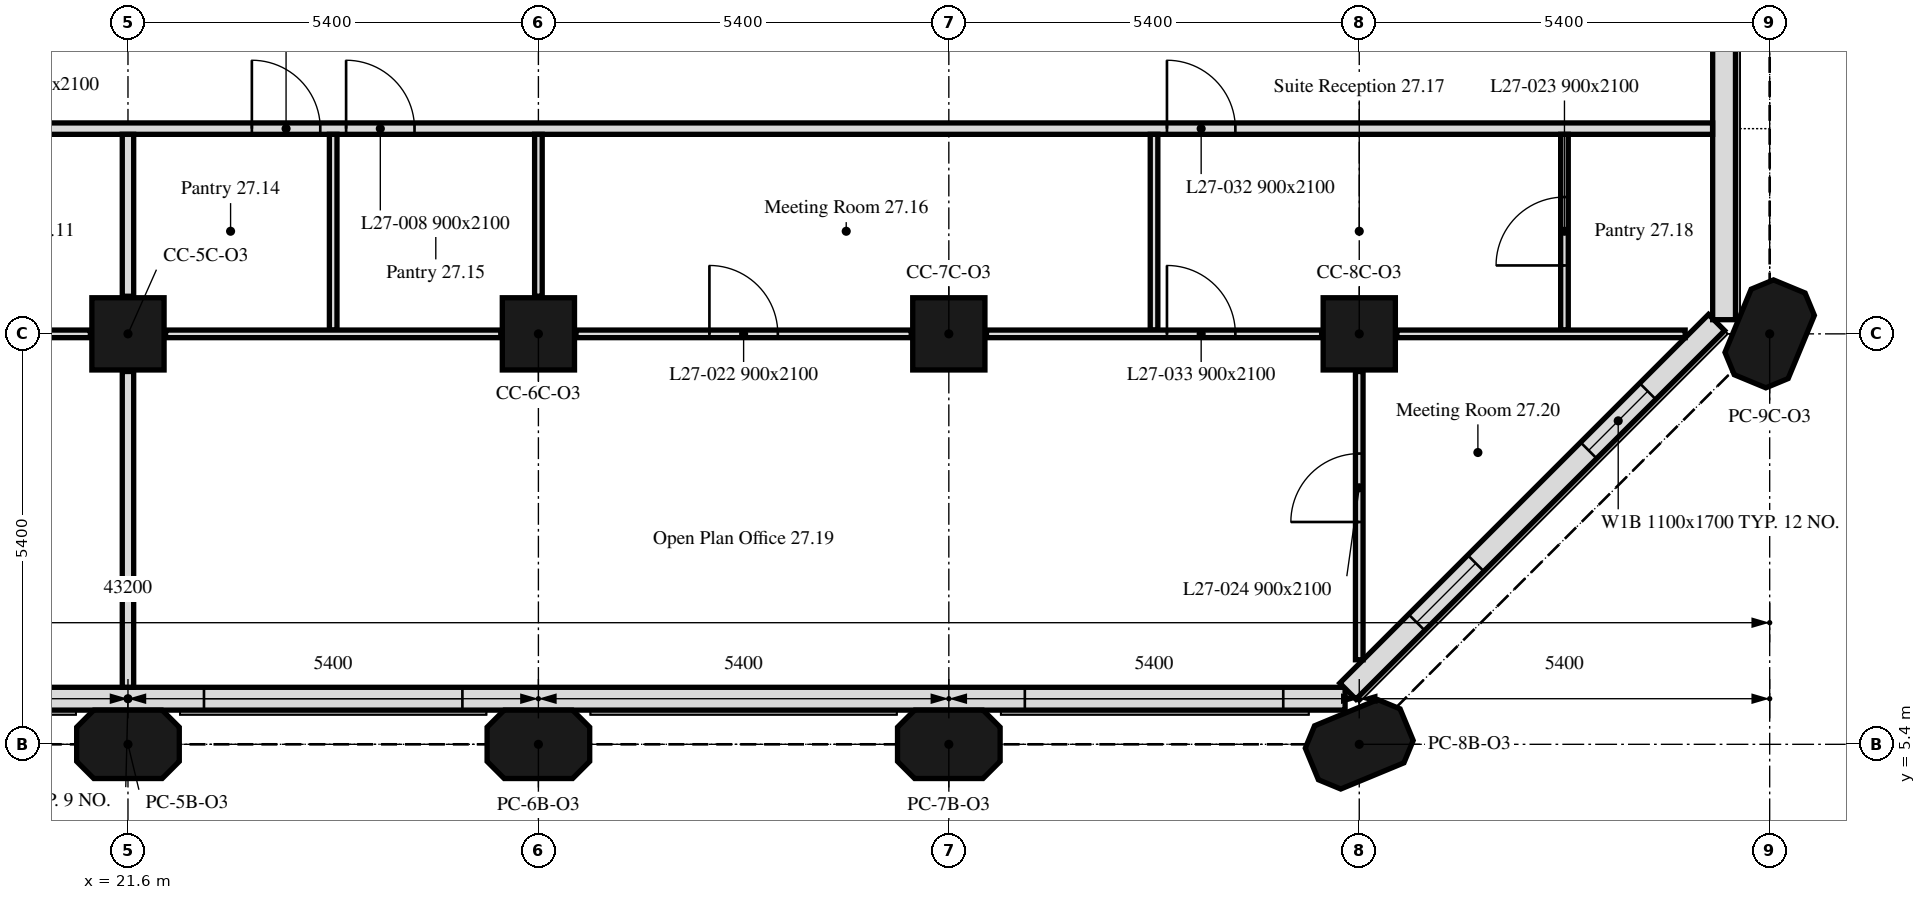
"""IFC4 building model, lengths in metres.
Left out: names, types, materials, properties, quantities, classifications, styles, units other than length and angle.
Written with IfcOpenShell. Run it as: python <this file> out.ifc"""

import sys

from ifc_helpers import new_model, si_unit, direction, frame, frame_2d, origin, origin_2d, place, context, subcontext, project, spatial, polyline, rectangle, outline, extrude, element, fill, save


model = new_model("IFC4")
c1 = context("Model", 3, precision=1e-05, world=origin(), true_north=direction((0.0, 1.0)))
c2 = subcontext(c1, "Body", "Model", "MODEL_VIEW")
j1 = project(units=[si_unit("LENGTHUNIT", "METRE"), si_unit("PLANEANGLEUNIT", "RADIAN")], contexts=[c1])
p1 = place(None, origin())
s1 = spatial("IfcSite", under=j1, at=p1, CompositionType="ELEMENT")
p2 = place(p1, origin())
s2 = spatial("IfcBuilding", under=s1, at=p2, CompositionType="ELEMENT")
p3 = place(p2, frame((0.0, 0.0, 114.4)))
s3 = spatial("IfcBuildingStorey", under=s2, at=p3, CompositionType="ELEMENT", Elevation=114.4)
for number, where, z_axis, x_axis in (
    (1, (21.6, 5.4, 0.0), (0.0, 0.0, 1.0), (1.0, 0.0, 0.0)),
    (2, (27.0, 5.4, 0.0), (0.0, 0.0, 1.0), (1.0, 0.0, 0.0)),
    (3, (32.4, 5.4, 0.0), (0.0, 0.0, 1.0), (1.0, 0.0, 0.0)),
    (4, (37.8, 5.4, 0.0), (0.0, 0.0, 1.0), (0.924, 0.383, 0.0)),
):
    element("IfcColumn", number, at=place(p3, frame(where, z_axis=z_axis, x_axis=x_axis)), inside=s3, PredefinedType="COLUMN", context=c2, shape_type="SweptSolid", body=[
        extrude(outline(polyline([(-0.45, -0.45), (0.45, -0.45), (0.675, -0.225), (0.675, 0.225), (0.45, 0.45), (-0.45, 0.45), (-0.675, 0.225), (-0.675, -0.225), (-0.45, -0.45)])), origin(), (0.0, 0.0, 1.0), 3.5),
    ])
for number, where, z_axis, x_axis in (
    (5, (21.6, 10.8, 0.0), (0.0, 0.0, 1.0), (1.0, 0.0, 0.0)),
    (6, (27.0, 10.8, 0.0), (0.0, 0.0, 1.0), (1.0, 0.0, 0.0)),
    (7, (32.4, 10.8, 0.0), (0.0, 0.0, 1.0), (1.0, 0.0, 0.0)),
    (8, (37.8, 10.8, 0.0), (0.0, 0.0, 1.0), (1.0, 0.0, 0.0)),
):
    element("IfcColumn", number, at=place(p3, frame(where, z_axis=z_axis, x_axis=x_axis)), inside=s3, PredefinedType="COLUMN", context=c2, shape_type="SweptSolid", body=[
        extrude(rectangle(XDim=0.95, YDim=0.95, at=origin_2d()), origin(), (0.0, 0.0, 1.0), 3.5),
    ])
p4 = place(p3, frame((43.2, 10.8, 0.0), z_axis=(0.0, 0.0, 1.0), x_axis=(0.382683432365, 0.923879532511, 0.0)))
e9 = element("IfcColumn", 9, at=p4, inside=s3, PredefinedType="COLUMN", context=c2, shape_type="SweptSolid", body=[
    extrude(outline(polyline([(-0.45, -0.45), (0.45, -0.45), (0.675, -0.225), (0.675, 0.225), (0.45, 0.45), (-0.45, 0.45), (-0.675, 0.225), (-0.675, -0.225), (-0.45, -0.45)])), origin(), (0.0, 0.0, 1.0), 3.5),
])
p5 = place(p3, frame((5.586, 6.0, 0.0), z_axis=(0.0, 0.0, 1.0), x_axis=(1.0, 0.0, 0.0)))
e10 = element("IfcWall", 10, at=p5, inside=s3, PredefinedType="SOLIDWALL", context=c2, shape_type="SweptSolid", body=[
    extrude(rectangle(XDim=32.027, YDim=0.3, at=frame_2d((16.014, 0.0))), origin(), (0.0, 0.0, 1.0), 3.5),
])
p6 = place(p5, frame((6.214, 0.0, 0.9)))
e11 = element("IfcOpeningElement", 11, at=p6, cuts=e10, PredefinedType="OPENING", context=c2, shape_type="SweptSolid", body=[
    extrude(rectangle(XDim=3.4, YDim=1.7, at=frame_2d((1.7, 0.85))), frame((0.0, 0.16, 0.0), z_axis=(0.0, -1.0, 0.0), x_axis=(1.0, 0.0, 0.0)), (0.0, 0.0, 1.0), 0.32),
])
p7 = place(p5, frame((17.014, 0.0, 0.9)))
e12 = element("IfcOpeningElement", 12, at=p7, cuts=e10, PredefinedType="OPENING", context=c2, shape_type="SweptSolid", body=[
    extrude(rectangle(XDim=3.4, YDim=1.7, at=frame_2d((1.7, 0.85))), frame((0.0, 0.16, 0.0), z_axis=(0.0, -1.0, 0.0), x_axis=(1.0, 0.0, 0.0)), (0.0, 0.0, 1.0), 0.32),
])
p8 = place(p5, frame((27.814, 0.0, 0.9)))
e13 = element("IfcOpeningElement", 13, at=p8, cuts=e10, PredefinedType="OPENING", context=c2, shape_type="SweptSolid", body=[
    extrude(rectangle(XDim=3.4, YDim=1.7, at=frame_2d((1.7, 0.85))), frame((0.0, 0.16, 0.0), z_axis=(0.0, -1.0, 0.0), x_axis=(1.0, 0.0, 0.0)), (0.0, 0.0, 1.0), 0.32),
])
p9 = place(p3, frame((37.65, 6.099, 0.0), z_axis=(0.0, 0.0, 1.0), x_axis=(0.707106781187, 0.707106781187, 0.0)))
e14 = element("IfcWall", 14, at=p9, inside=s3, PredefinedType="SOLIDWALL", context=c2, shape_type="SweptSolid", body=[
    extrude(rectangle(XDim=6.86, YDim=0.3, at=frame_2d((3.43, 0.0))), origin(), (0.0, 0.0, 1.0), 3.5),
])
p10 = place(p9, frame((1.28, 0.0, 0.9)))
e15 = element("IfcOpeningElement", 15, at=p10, cuts=e14, PredefinedType="OPENING", context=c2, shape_type="SweptSolid", body=[
    extrude(rectangle(XDim=1.1, YDim=1.7, at=frame_2d((0.55, 0.85))), frame((0.0, 0.16, 0.0), z_axis=(0.0, -1.0, 0.0), x_axis=(1.0, 0.0, 0.0)), (0.0, 0.0, 1.0), 0.32),
])
p11 = place(p9, frame((4.48, 0.0, 0.9)))
e16 = element("IfcOpeningElement", 16, at=p11, cuts=e14, PredefinedType="OPENING", context=c2, shape_type="SweptSolid", body=[
    extrude(rectangle(XDim=1.1, YDim=1.7, at=frame_2d((0.55, 0.85))), frame((0.0, 0.16, 0.0), z_axis=(0.0, -1.0, 0.0), x_axis=(1.0, 0.0, 0.0)), (0.0, 0.0, 1.0), 0.32),
])
p12 = place(p3, frame((42.6, 10.986, 0.0), z_axis=(0.0, 0.0, 1.0), x_axis=(0.0, 1.0, 0.0)))
e17 = element("IfcWall", 17, at=p12, inside=s3, PredefinedType="SOLIDWALL", context=c2, shape_type="SweptSolid", body=[
    extrude(rectangle(XDim=5.214, YDim=0.3, at=frame_2d((2.607, 0.0))), origin(), (0.0, 0.0, 1.0), 3.5),
])
p13 = place(p3, frame((0.751, 13.5, 0.0), z_axis=(0.0, 0.0, 1.0), x_axis=(1.0, 0.0, 0.0)))
e18 = element("IfcWall", 18, at=p13, inside=s3, PredefinedType="PARTITIONING", context=c2, shape_type="SweptSolid", body=[
    extrude(rectangle(XDim=41.698, YDim=0.15, at=frame_2d((20.849, 0.0))), origin(), (0.0, 0.0, 1.0), 3.5),
])
p14 = place(p13, frame((6.279, 0.0, 0.0)))
e19 = element("IfcOpeningElement", 19, at=p14, cuts=e18, PredefinedType="OPENING", context=c2, shape_type="SweptSolid", body=[
    extrude(rectangle(XDim=0.9, YDim=2.1, at=frame_2d((0.45, 1.05))), frame((0.0, 0.075, 0.0), z_axis=(0.0, -1.0, 0.0), x_axis=(1.0, 0.0, 0.0)), (0.0, 0.0, 1.0), 0.15),
])
p15 = place(p13, frame((7.519, 0.0, 0.0)))
e20 = element("IfcOpeningElement", 20, at=p15, cuts=e18, PredefinedType="OPENING", context=c2, shape_type="SweptSolid", body=[
    extrude(rectangle(XDim=0.9, YDim=2.1, at=frame_2d((0.45, 1.05))), frame((0.0, 0.075, 0.0), z_axis=(0.0, -1.0, 0.0), x_axis=(1.0, 0.0, 0.0)), (0.0, 0.0, 1.0), 0.15),
])
p16 = place(p13, frame((11.679, 0.0, 0.0)))
e21 = element("IfcOpeningElement", 21, at=p16, cuts=e18, PredefinedType="OPENING", context=c2, shape_type="SweptSolid", body=[
    extrude(rectangle(XDim=0.9, YDim=2.1, at=frame_2d((0.45, 1.05))), frame((0.0, 0.075, 0.0), z_axis=(0.0, -1.0, 0.0), x_axis=(1.0, 0.0, 0.0)), (0.0, 0.0, 1.0), 0.15),
])
p17 = place(p13, frame((22.479, 0.0, 0.0)))
e22 = element("IfcOpeningElement", 22, at=p17, cuts=e18, PredefinedType="OPENING", context=c2, shape_type="SweptSolid", body=[
    extrude(rectangle(XDim=0.9, YDim=2.1, at=frame_2d((0.45, 1.05))), frame((0.0, 0.075, 0.0), z_axis=(0.0, -1.0, 0.0), x_axis=(1.0, 0.0, 0.0)), (0.0, 0.0, 1.0), 0.15),
])
p18 = place(p13, frame((23.719, 0.0, 0.0)))
e23 = element("IfcOpeningElement", 23, at=p18, cuts=e18, PredefinedType="OPENING", context=c2, shape_type="SweptSolid", body=[
    extrude(rectangle(XDim=0.9, YDim=2.1, at=frame_2d((0.45, 1.05))), frame((0.0, 0.075, 0.0), z_axis=(0.0, -1.0, 0.0), x_axis=(1.0, 0.0, 0.0)), (0.0, 0.0, 1.0), 0.15),
])
p19 = place(p13, frame((2.174, 0.0, 0.0)))
e24 = element("IfcOpeningElement", 24, at=p19, cuts=e18, PredefinedType="OPENING", context=c2, shape_type="SweptSolid", body=[
    extrude(rectangle(XDim=0.9, YDim=2.1, at=frame_2d((0.45, 1.05))), frame((0.0, 0.075, 0.0), z_axis=(0.0, -1.0, 0.0), x_axis=(1.0, 0.0, 0.0)), (0.0, 0.0, 1.0), 0.15),
])
p20 = place(p13, frame((17.079, 0.0, 0.0)))
e25 = element("IfcOpeningElement", 25, at=p20, cuts=e18, PredefinedType="OPENING", context=c2, shape_type="SweptSolid", body=[
    extrude(rectangle(XDim=0.9, YDim=2.1, at=frame_2d((0.45, 1.05))), frame((0.0, 0.075, 0.0), z_axis=(0.0, -1.0, 0.0), x_axis=(1.0, 0.0, 0.0)), (0.0, 0.0, 1.0), 0.15),
])
p21 = place(p13, frame((34.519, 0.0, 0.0)))
e26 = element("IfcOpeningElement", 26, at=p21, cuts=e18, PredefinedType="OPENING", context=c2, shape_type="SweptSolid", body=[
    extrude(rectangle(XDim=0.9, YDim=2.1, at=frame_2d((0.45, 1.05))), frame((0.0, 0.075, 0.0), z_axis=(0.0, -1.0, 0.0), x_axis=(1.0, 0.0, 0.0)), (0.0, 0.0, 1.0), 0.15),
])
p22 = place(p3, frame((16.695, 10.8, 0.0), z_axis=(0.0, 0.0, 1.0), x_axis=(1.0, 0.0, 0.0)))
e27 = element("IfcWall", 27, at=p22, inside=s3, PredefinedType="PARTITIONING", context=c2, shape_type="SweptSolid", body=[
    extrude(rectangle(XDim=4.41, YDim=0.1, at=frame_2d((2.205, 0.0))), origin(), (0.0, 0.0, 1.0), 3.5),
])
p23 = place(p3, frame((21.6, 11.295, 0.0), z_axis=(0.0, 0.0, 1.0), x_axis=(0.0, 1.0, 0.0)))
e28 = element("IfcWall", 28, at=p23, inside=s3, PredefinedType="PARTITIONING", context=c2, shape_type="SweptSolid", body=[
    extrude(rectangle(XDim=2.13, YDim=0.15, at=frame_2d((1.065, 0.0))), origin(), (0.0, 0.0, 1.0), 3.5),
])
p24 = place(p3, frame((21.6, 6.151, 0.0), z_axis=(0.0, 0.0, 1.0), x_axis=(0.0, 1.0, 0.0)))
e29 = element("IfcWall", 29, at=p24, inside=s3, PredefinedType="PARTITIONING", context=c2, shape_type="SweptSolid", body=[
    extrude(rectangle(XDim=4.154, YDim=0.15, at=frame_2d((2.077, 0.0))), origin(), (0.0, 0.0, 1.0), 3.5),
])
p25 = place(p3, frame((24.3, 10.85, 0.0), z_axis=(0.0, 0.0, 1.0), x_axis=(0.0, 1.0, 0.0)))
e30 = element("IfcWall", 30, at=p25, inside=s3, PredefinedType="PARTITIONING", context=c2, shape_type="SweptSolid", body=[
    extrude(rectangle(XDim=2.575, YDim=0.1, at=frame_2d((1.288, 0.0))), origin(), (0.0, 0.0, 1.0), 3.5),
])
p26 = place(p3, frame((22.095, 10.8, 0.0), z_axis=(0.0, 0.0, 1.0), x_axis=(1.0, 0.0, 0.0)))
e31 = element("IfcWall", 31, at=p26, inside=s3, PredefinedType="PARTITIONING", context=c2, shape_type="SweptSolid", body=[
    extrude(rectangle(XDim=4.41, YDim=0.1, at=frame_2d((2.205, 0.0))), origin(), (0.0, 0.0, 1.0), 3.5),
])
p27 = place(p3, frame((27.0, 11.295, 0.0), z_axis=(0.0, 0.0, 1.0), x_axis=(0.0, 1.0, 0.0)))
e32 = element("IfcWall", 32, at=p27, inside=s3, PredefinedType="PARTITIONING", context=c2, shape_type="SweptSolid", body=[
    extrude(rectangle(XDim=2.13, YDim=0.1, at=frame_2d((1.065, 0.0))), origin(), (0.0, 0.0, 1.0), 3.5),
])
p28 = place(p3, frame((27.495, 10.8, 0.0), z_axis=(0.0, 0.0, 1.0), x_axis=(1.0, 0.0, 0.0)))
e33 = element("IfcWall", 33, at=p28, inside=s3, PredefinedType="PARTITIONING", context=c2, shape_type="SweptSolid", body=[
    extrude(rectangle(XDim=4.41, YDim=0.1, at=frame_2d((2.205, 0.0))), origin(), (0.0, 0.0, 1.0), 3.5),
])
p29 = place(p28, frame((1.755, 0.0, 0.0)))
e34 = element("IfcOpeningElement", 34, at=p29, cuts=e33, PredefinedType="OPENING", context=c2, shape_type="SweptSolid", body=[
    extrude(rectangle(XDim=0.9, YDim=2.1, at=frame_2d((0.45, 1.05))), frame((0.0, 0.05, 0.0), z_axis=(0.0, -1.0, 0.0), x_axis=(1.0, 0.0, 0.0)), (0.0, 0.0, 1.0), 0.1),
])
p30 = place(p3, frame((35.1, 10.85, 0.0), z_axis=(0.0, 0.0, 1.0), x_axis=(0.0, 1.0, 0.0)))
e35 = element("IfcWall", 35, at=p30, inside=s3, PredefinedType="PARTITIONING", context=c2, shape_type="SweptSolid", body=[
    extrude(rectangle(XDim=2.575, YDim=0.1, at=frame_2d((1.288, 0.0))), origin(), (0.0, 0.0, 1.0), 3.5),
])
p31 = place(p3, frame((32.895, 10.8, 0.0), z_axis=(0.0, 0.0, 1.0), x_axis=(1.0, 0.0, 0.0)))
e36 = element("IfcWall", 36, at=p31, inside=s3, PredefinedType="PARTITIONING", context=c2, shape_type="SweptSolid", body=[
    extrude(rectangle(XDim=4.41, YDim=0.1, at=frame_2d((2.205, 0.0))), origin(), (0.0, 0.0, 1.0), 3.5),
])
p32 = place(p31, frame((2.375, 0.0, 0.0)))
e37 = element("IfcOpeningElement", 37, at=p32, cuts=e36, PredefinedType="OPENING", context=c2, shape_type="SweptSolid", body=[
    extrude(rectangle(XDim=0.9, YDim=2.1, at=frame_2d((0.45, 1.05))), frame((0.0, 0.05, 0.0), z_axis=(0.0, -1.0, 0.0), x_axis=(1.0, 0.0, 0.0)), (0.0, 0.0, 1.0), 0.1),
])
p33 = place(p3, frame((40.5, 10.85, 0.0), z_axis=(0.0, 0.0, 1.0), x_axis=(0.0, 1.0, 0.0)))
e38 = element("IfcWall", 38, at=p33, inside=s3, PredefinedType="PARTITIONING", context=c2, shape_type="SweptSolid", body=[
    extrude(rectangle(XDim=2.575, YDim=0.1, at=frame_2d((1.288, 0.0))), origin(), (0.0, 0.0, 1.0), 3.5),
])
p34 = place(p33, frame((0.85, 0.0, 0.0)))
e39 = element("IfcOpeningElement", 39, at=p34, cuts=e38, PredefinedType="OPENING", context=c2, shape_type="SweptSolid", body=[
    extrude(rectangle(XDim=0.9, YDim=2.1, at=frame_2d((0.45, 1.05))), frame((0.0, 0.05, 0.0), z_axis=(0.0, -1.0, 0.0), x_axis=(1.0, 0.0, 0.0)), (0.0, 0.0, 1.0), 0.1),
])
p35 = place(p3, frame((38.295, 10.8, 0.0), z_axis=(0.0, 0.0, 1.0), x_axis=(1.0, 0.0, 0.0)))
e40 = element("IfcWall", 40, at=p35, inside=s3, PredefinedType="PARTITIONING", context=c2, shape_type="SweptSolid", body=[
    extrude(rectangle(XDim=3.793, YDim=0.1, at=frame_2d((1.896, 0.0))), origin(), (0.0, 0.0, 1.0), 3.5),
])
p36 = place(p3, frame((37.8, 6.512, 0.0), z_axis=(0.0, 0.0, 1.0), x_axis=(0.0, 1.0, 0.0)))
e41 = element("IfcWall", 41, at=p36, inside=s3, PredefinedType="PARTITIONING", context=c2, shape_type="SweptSolid", body=[
    extrude(rectangle(XDim=3.793, YDim=0.1, at=frame_2d((1.896, 0.0))), origin(), (0.0, 0.0, 1.0), 3.5),
])
p37 = place(p36, frame((1.813, 0.0, 0.0)))
e42 = element("IfcOpeningElement", 42, at=p37, cuts=e41, PredefinedType="OPENING", context=c2, shape_type="SweptSolid", body=[
    extrude(rectangle(XDim=0.9, YDim=2.1, at=frame_2d((0.45, 1.05))), frame((0.0, 0.05, 0.0), z_axis=(0.0, -1.0, 0.0), x_axis=(1.0, 0.0, 0.0)), (0.0, 0.0, 1.0), 0.1),
])
p38 = place(p7, origin())
e43 = element("IfcWindow", 43, at=p38, inside=s3, PartitioningType="SINGLE_PANEL", PredefinedType="WINDOW", context=c2, shape_type="SweptSolid", body=[
    extrude(rectangle(XDim=3.4, YDim=1.7, at=frame_2d((1.7, 0.85))), frame((0.0, 0.03, 0.0), z_axis=(0.0, -1.0, 0.0), x_axis=(1.0, 0.0, 0.0)), (0.0, 0.0, 1.0), 0.06),
])
fill(e12, e43)
p39 = place(p8, origin())
e44 = element("IfcWindow", 44, at=p39, inside=s3, PartitioningType="SINGLE_PANEL", PredefinedType="WINDOW", context=c2, shape_type="SweptSolid", body=[
    extrude(rectangle(XDim=3.4, YDim=1.7, at=frame_2d((1.7, 0.85))), frame((0.0, 0.03, 0.0), z_axis=(0.0, -1.0, 0.0), x_axis=(1.0, 0.0, 0.0)), (0.0, 0.0, 1.0), 0.06),
])
fill(e13, e44)
p40 = place(p10, origin())
e45 = element("IfcWindow", 45, at=p40, inside=s3, PartitioningType="SINGLE_PANEL", PredefinedType="WINDOW", context=c2, shape_type="SweptSolid", body=[
    extrude(rectangle(XDim=1.1, YDim=1.7, at=frame_2d((0.55, 0.85))), frame((0.0, 0.03, 0.0), z_axis=(0.0, -1.0, 0.0), x_axis=(1.0, 0.0, 0.0)), (0.0, 0.0, 1.0), 0.06),
])
fill(e15, e45)
p41 = place(p11, origin())
e46 = element("IfcWindow", 46, at=p41, inside=s3, PartitioningType="SINGLE_PANEL", PredefinedType="WINDOW", context=c2, shape_type="SweptSolid", body=[
    extrude(rectangle(XDim=1.1, YDim=1.7, at=frame_2d((0.55, 0.85))), frame((0.0, 0.03, 0.0), z_axis=(0.0, -1.0, 0.0), x_axis=(1.0, 0.0, 0.0)), (0.0, 0.0, 1.0), 0.06),
])
fill(e16, e46)
p42 = place(p17, origin())
e47 = element("IfcDoor", 47, at=p42, inside=s3, OperationType="SINGLE_SWING_LEFT", PredefinedType="DOOR", context=c2, shape_type="SweptSolid", body=[
    extrude(rectangle(XDim=0.9, YDim=2.1, at=frame_2d((0.45, 1.05))), frame((0.0, 0.025, 0.0), z_axis=(0.0, -1.0, 0.0), x_axis=(1.0, 0.0, 0.0)), (0.0, 0.0, 1.0), 0.05),
])
fill(e22, e47)
p43 = place(p18, origin())
e48 = element("IfcDoor", 48, at=p43, inside=s3, OperationType="SINGLE_SWING_LEFT", PredefinedType="DOOR", context=c2, shape_type="SweptSolid", body=[
    extrude(rectangle(XDim=0.9, YDim=2.1, at=frame_2d((0.45, 1.05))), frame((0.0, 0.025, 0.0), z_axis=(0.0, -1.0, 0.0), x_axis=(1.0, 0.0, 0.0)), (0.0, 0.0, 1.0), 0.05),
])
fill(e23, e48)
p44 = place(p29, origin())
e49 = element("IfcDoor", 49, at=p44, inside=s3, OperationType="SINGLE_SWING_RIGHT", PredefinedType="DOOR", context=c2, shape_type="SweptSolid", body=[
    extrude(rectangle(XDim=0.9, YDim=2.1, at=frame_2d((0.45, 1.05))), frame((0.0, 0.025, 0.0), z_axis=(0.0, -1.0, 0.0), x_axis=(1.0, 0.0, 0.0)), (0.0, 0.0, 1.0), 0.05),
])
fill(e34, e49)
p45 = place(p34, origin())
e50 = element("IfcDoor", 50, at=p45, inside=s3, OperationType="SINGLE_SWING_LEFT", PredefinedType="DOOR", context=c2, shape_type="SweptSolid", body=[
    extrude(rectangle(XDim=0.9, YDim=2.1, at=frame_2d((0.45, 1.05))), frame((0.0, 0.025, 0.0), z_axis=(0.0, -1.0, 0.0), x_axis=(1.0, 0.0, 0.0)), (0.0, 0.0, 1.0), 0.05),
])
fill(e39, e50)
p46 = place(p37, origin())
e51 = element("IfcDoor", 51, at=p46, inside=s3, OperationType="SINGLE_SWING_LEFT", PredefinedType="DOOR", context=c2, shape_type="SweptSolid", body=[
    extrude(rectangle(XDim=0.9, YDim=2.1, at=frame_2d((0.45, 1.05))), frame((0.0, 0.025, 0.0), z_axis=(0.0, -1.0, 0.0), x_axis=(1.0, 0.0, 0.0)), (0.0, 0.0, 1.0), 0.05),
])
fill(e42, e51)
p47 = place(p21, origin())
e52 = element("IfcDoor", 52, at=p47, inside=s3, OperationType="SINGLE_SWING_LEFT", PredefinedType="DOOR", context=c2, shape_type="SweptSolid", body=[
    extrude(rectangle(XDim=0.9, YDim=2.1, at=frame_2d((0.45, 1.05))), frame((0.0, 0.025, 0.0), z_axis=(0.0, -1.0, 0.0), x_axis=(1.0, 0.0, 0.0)), (0.0, 0.0, 1.0), 0.05),
])
fill(e26, e52)
p48 = place(p32, origin())
e53 = element("IfcDoor", 53, at=p48, inside=s3, OperationType="SINGLE_SWING_LEFT", PredefinedType="DOOR", context=c2, shape_type="SweptSolid", body=[
    extrude(rectangle(XDim=0.9, YDim=2.1, at=frame_2d((0.45, 1.05))), frame((0.0, 0.025, 0.0), z_axis=(0.0, -1.0, 0.0), x_axis=(1.0, 0.0, 0.0)), (0.0, 0.0, 1.0), 0.05),
])
fill(e37, e53)
save(model, sys.argv[1])
